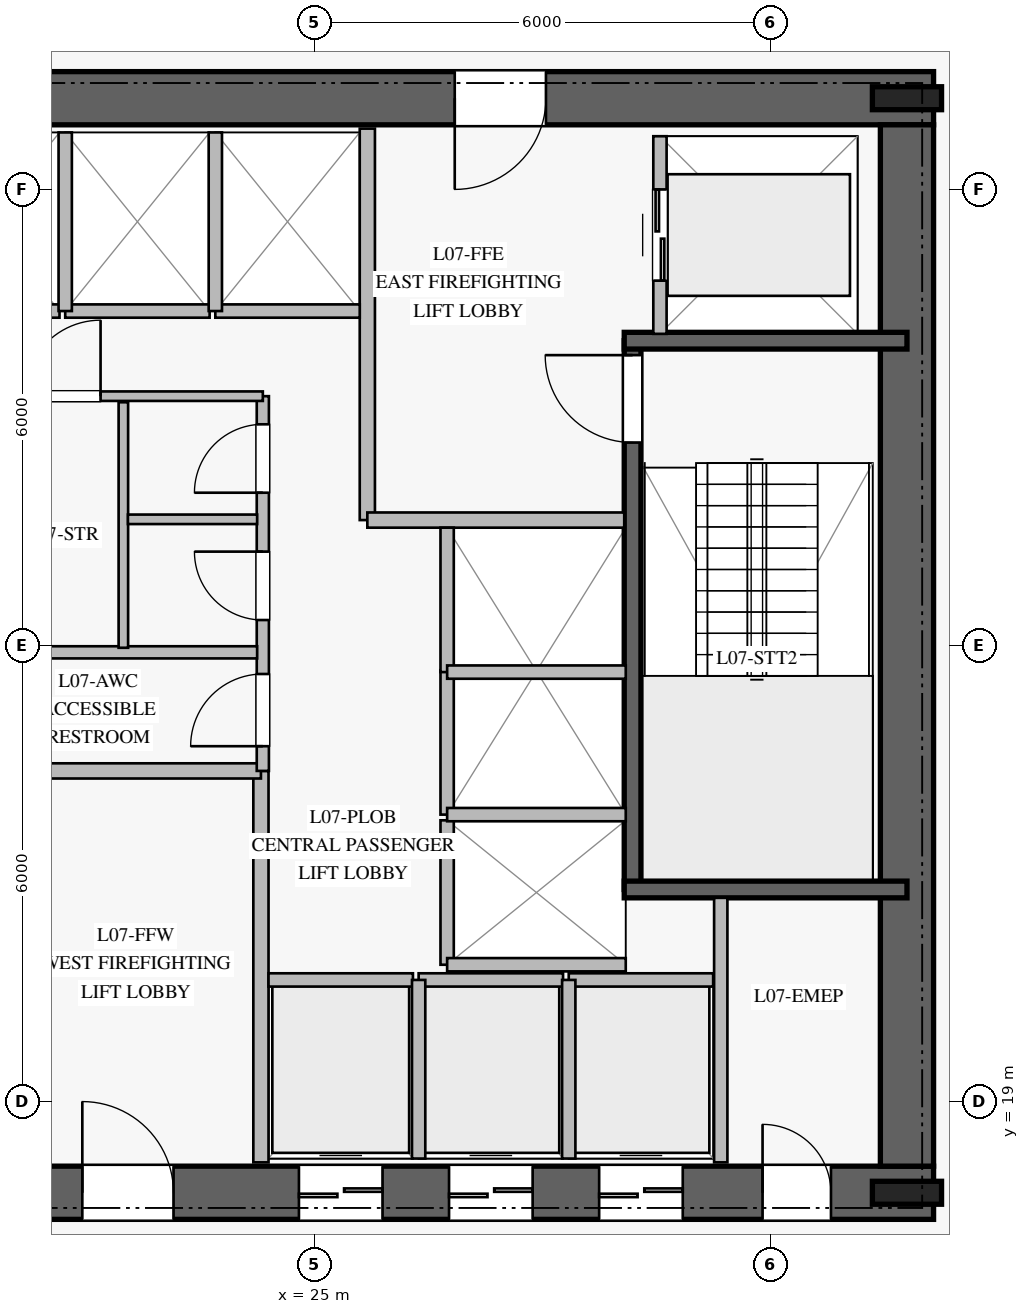
"""IFC4 building model, lengths in metres.
Left out: names, types, materials, properties, quantities, classifications, styles, units other than length and angle.
Written with IfcOpenShell. Run it as: python <this file> out.ifc"""

import sys

from ifc_helpers import new_model, si_unit, direction, frame, frame_2d, origin, origin_2d, place, context, subcontext, project, spatial, rectangle, i_section, extrude, element, fill, save


model = new_model("IFC4")
c1 = context("Model", 3, precision=1e-05, world=origin(), true_north=direction((0.0, 1.0)))
c2 = subcontext(c1, "Body", "Model", "MODEL_VIEW")
j1 = project(units=[si_unit("LENGTHUNIT", "METRE"), si_unit("PLANEANGLEUNIT", "RADIAN")], contexts=[c1])
p1 = place(None, origin())
s1 = spatial("IfcSite", under=j1, at=p1, CompositionType="ELEMENT")
p2 = place(p1, origin())
s2 = spatial("IfcBuilding", under=s1, at=p2, CompositionType="ELEMENT")
p3 = place(p2, frame((0.0, 0.0, 32.0)))
s3 = spatial("IfcBuildingStorey", under=s2, at=p3, CompositionType="ELEMENT", Elevation=32.0)
p4 = place(p3, frame((16.85, 17.8, 0.0), z_axis=(0.0, 0.0, 1.0), x_axis=(1.0, 0.0, 0.0)))
e1 = element("IfcWall", 1, at=p4, inside=s3, PredefinedType="SHEAR", context=c2, shape_type="SweptSolid", body=[
    extrude(rectangle(XDim=16.3, YDim=0.7, at=frame_2d((8.15, 0.0))), origin(), (0.0, 0.0, 1.0), 3.76),
])
p5 = place(p4, frame((5.1, 0.0, 0.0)))
e2 = element("IfcOpeningElement", 2, at=p5, cuts=e1, PredefinedType="OPENING", context=c2, shape_type="SweptSolid", body=[
    extrude(rectangle(XDim=1.2, YDim=2.25, at=frame_2d((0.6, 1.125))), frame((0.0, 0.36, 0.0), z_axis=(0.0, -1.0, 0.0), x_axis=(1.0, 0.0, 0.0)), (0.0, 0.0, 1.0), 0.72),
])
p6 = place(p4, frame((14.05, 0.0, 0.0)))
e3 = element("IfcOpeningElement", 3, at=p6, cuts=e1, PredefinedType="OPENING", context=c2, shape_type="SweptSolid", body=[
    extrude(rectangle(XDim=0.9, YDim=2.1, at=frame_2d((0.45, 1.05))), frame((0.0, 0.36, 0.0), z_axis=(0.0, -1.0, 0.0), x_axis=(1.0, 0.0, 0.0)), (0.0, 0.0, 1.0), 0.72),
])
p7 = place(p4, frame((7.95, 0.0, 0.0)))
e4 = element("IfcOpeningElement", 4, at=p7, cuts=e1, PredefinedType="OPENING", context=c2, shape_type="SweptSolid", body=[
    extrude(rectangle(XDim=1.1, YDim=2.2, at=frame_2d((0.55, 1.1))), frame((0.0, 0.36, 0.0), z_axis=(0.0, -1.0, 0.0), x_axis=(1.0, 0.0, 0.0)), (0.0, 0.0, 1.0), 0.72),
])
p8 = place(p4, frame((9.925, 0.0, 0.0)))
e5 = element("IfcOpeningElement", 5, at=p8, cuts=e1, PredefinedType="OPENING", context=c2, shape_type="SweptSolid", body=[
    extrude(rectangle(XDim=1.1, YDim=2.2, at=frame_2d((0.55, 1.1))), frame((0.0, 0.36, 0.0), z_axis=(0.0, -1.0, 0.0), x_axis=(1.0, 0.0, 0.0)), (0.0, 0.0, 1.0), 0.72),
])
p9 = place(p4, frame((11.9, 0.0, 0.0)))
e6 = element("IfcOpeningElement", 6, at=p9, cuts=e1, PredefinedType="OPENING", context=c2, shape_type="SweptSolid", body=[
    extrude(rectangle(XDim=1.1, YDim=2.2, at=frame_2d((0.55, 1.1))), frame((0.0, 0.36, 0.0), z_axis=(0.0, -1.0, 0.0), x_axis=(1.0, 0.0, 0.0)), (0.0, 0.0, 1.0), 0.72),
])
p10 = place(p3, frame((33.15, 32.2, 0.0), z_axis=(0.0, 0.0, 1.0), x_axis=(-1.0, 0.0, 0.0)))
e7 = element("IfcWall", 7, at=p10, inside=s3, PredefinedType="SHEAR", context=c2, shape_type="SweptSolid", body=[
    extrude(rectangle(XDim=16.3, YDim=0.7, at=frame_2d((8.15, 0.0))), origin(), (0.0, 0.0, 1.0), 3.76),
])
p11 = place(p10, frame((5.1, 0.0, 0.0)))
e8 = element("IfcOpeningElement", 8, at=p11, cuts=e7, PredefinedType="OPENING", context=c2, shape_type="SweptSolid", body=[
    extrude(rectangle(XDim=1.2, YDim=2.25, at=frame_2d((0.6, 1.125))), frame((0.0, 0.36, 0.0), z_axis=(0.0, -1.0, 0.0), x_axis=(1.0, 0.0, 0.0)), (0.0, 0.0, 1.0), 0.72),
])
p12 = place(p3, frame((32.8, 18.15, 0.0), z_axis=(0.0, 0.0, 1.0), x_axis=(0.0, 1.0, 0.0)))
e9 = element("IfcWall", 9, at=p12, inside=s3, PredefinedType="SHEAR", context=c2, shape_type="SweptSolid", body=[
    extrude(rectangle(XDim=13.7, YDim=0.7, at=frame_2d((6.85, 0.0))), origin(), (0.0, 0.0, 1.0), 3.76),
])
for number, where, z_axis, x_axis in (
    (10, (32.8, 17.8, 0.0), (0.0, 0.0, 1.0), (1.0, 0.0, 0.0)),
    (11, (32.8, 32.2, 0.0), (0.0, 0.0, 1.0), (1.0, 0.0, 0.0)),
):
    element("IfcColumn", number, at=place(p3, frame(where, z_axis=z_axis, x_axis=x_axis)), inside=s3, PredefinedType="COLUMN", context=c2, shape_type="SweptSolid", body=[
        extrude(i_section(OverallWidth=0.302, OverallDepth=0.91, WebThickness=0.021, FlangeThickness=0.04, at=origin_2d()), origin(), (0.0, 0.0, 1.0), 4.0),
    ])
p13 = place(p3, frame((29.19, 21.79, 0.0), z_axis=(0.0, 0.0, 1.0), x_axis=(0.0, 1.0, 0.0)))
e12 = element("IfcWall", 12, at=p13, inside=s3, PredefinedType="SOLIDWALL", context=c2, shape_type="SweptSolid", body=[
    extrude(rectangle(XDim=7.22, YDim=0.22, at=frame_2d((3.61, 0.0))), origin(), (0.0, 0.0, 1.0), 3.76),
])
p14 = place(p13, frame((5.88, 0.0, 0.0)))
e13 = element("IfcOpeningElement", 13, at=p14, cuts=e12, PredefinedType="OPENING", context=c2, shape_type="SweptSolid", body=[
    extrude(rectangle(XDim=1.15, YDim=2.2, at=frame_2d((0.575, 1.1))), frame((0.0, 0.12, 0.0), z_axis=(0.0, -1.0, 0.0), x_axis=(1.0, 0.0, 0.0)), (0.0, 0.0, 1.0), 0.24),
])
for number, where, z_axis, x_axis in (
    (14, (29.08, 21.79, 0.0), (0.0, 0.0, 1.0), (1.0, 0.0, 0.0)),
    (15, (29.08, 29.01, 0.0), (0.0, 0.0, 1.0), (1.0, 0.0, 0.0)),
):
    element("IfcWall", number, at=place(p3, frame(where, z_axis=z_axis, x_axis=x_axis)), inside=s3, PredefinedType="SOLIDWALL", context=c2, shape_type="SweptSolid", body=[
        extrude(rectangle(XDim=3.72, YDim=0.22, at=frame_2d((1.86, 0.0))), origin(), (0.0, 0.0, 1.0), 3.76),
    ])
p15 = place(p3, frame((24.3, 18.2, 0.0), z_axis=(0.0, 0.0, 1.0), x_axis=(0.0, 1.0, 0.0)))
e16 = element("IfcWall", 16, at=p15, inside=s3, PredefinedType="PARTITIONING", context=c2, shape_type="SweptSolid", body=[
    extrude(rectangle(XDim=5.15, YDim=0.2, at=frame_2d((2.575, 0.0))), origin(), (0.0, 0.0, 1.0), 3.76),
])
p16 = place(p3, frame((20.92, 23.35, 0.0), z_axis=(0.0, 0.0, 1.0), x_axis=(1.0, 0.0, 0.0)))
e17 = element("IfcWall", 17, at=p16, inside=s3, PredefinedType="PARTITIONING", context=c2, shape_type="SweptSolid", body=[
    extrude(rectangle(XDim=3.38, YDim=0.2, at=frame_2d((1.69, 0.0))), origin(), (0.0, 0.0, 1.0), 3.76),
])
p17 = place(p3, frame((25.7, 26.65, 0.0), z_axis=(0.0, 0.0, 1.0), x_axis=(0.0, 1.0, 0.0)))
e18 = element("IfcWall", 18, at=p17, inside=s3, PredefinedType="PARTITIONING", context=c2, shape_type="SweptSolid", body=[
    extrude(rectangle(XDim=5.15, YDim=0.2, at=frame_2d((2.575, 0.0))), origin(), (0.0, 0.0, 1.0), 3.76),
])
p18 = place(p3, frame((25.7, 26.65, 0.0), z_axis=(0.0, 0.0, 1.0), x_axis=(1.0, 0.0, 0.0)))
e19 = element("IfcWall", 19, at=p18, inside=s3, PredefinedType="PARTITIONING", context=c2, shape_type="SweptSolid", body=[
    extrude(rectangle(XDim=3.38, YDim=0.2, at=frame_2d((1.69, 0.0))), origin(), (0.0, 0.0, 1.0), 3.76),
])
p19 = place(p3, frame((24.325, 23.35, 0.0), z_axis=(0.0, 0.0, 1.0), x_axis=(0.0, 1.0, 0.0)))
e20 = element("IfcWall", 20, at=p19, inside=s3, PredefinedType="PLUMBINGWALL", context=c2, shape_type="SweptSolid", body=[
    extrude(rectangle(XDim=4.93, YDim=0.16, at=frame_2d((2.465, 0.0))), origin(), (0.0, 0.0, 1.0), 3.76),
])
p20 = place(p19, frame((0.325, 0.0, 0.0)))
e21 = element("IfcOpeningElement", 21, at=p20, cuts=e20, PredefinedType="OPENING", context=c2, shape_type="SweptSolid", body=[
    extrude(rectangle(XDim=0.95, YDim=2.1, at=frame_2d((0.475, 1.05))), frame((0.0, 0.09, 0.0), z_axis=(0.0, -1.0, 0.0), x_axis=(1.0, 0.0, 0.0)), (0.0, 0.0, 1.0), 0.18),
])
p21 = place(p19, frame((1.985, 0.0, 0.0)))
e22 = element("IfcOpeningElement", 22, at=p21, cuts=e20, PredefinedType="OPENING", context=c2, shape_type="SweptSolid", body=[
    extrude(rectangle(XDim=0.9, YDim=2.1, at=frame_2d((0.45, 1.05))), frame((0.0, 0.09, 0.0), z_axis=(0.0, -1.0, 0.0), x_axis=(1.0, 0.0, 0.0)), (0.0, 0.0, 1.0), 0.18),
])
p22 = place(p19, frame((3.66, 0.0, 0.0)))
e23 = element("IfcOpeningElement", 23, at=p22, cuts=e20, PredefinedType="OPENING", context=c2, shape_type="SweptSolid", body=[
    extrude(rectangle(XDim=0.9, YDim=2.1, at=frame_2d((0.45, 1.05))), frame((0.0, 0.09, 0.0), z_axis=(0.0, -1.0, 0.0), x_axis=(1.0, 0.0, 0.0)), (0.0, 0.0, 1.0), 0.18),
])
p23 = place(p3, frame((20.92, 28.28, 0.0), z_axis=(0.0, 0.0, 1.0), x_axis=(1.0, 0.0, 0.0)))
e24 = element("IfcWall", 24, at=p23, inside=s3, PredefinedType="PARTITIONING", context=c2, shape_type="SweptSolid", body=[
    extrude(rectangle(XDim=3.405, YDim=0.125, at=frame_2d((1.703, 0.0))), origin(), (0.0, 0.0, 1.0), 3.76),
])
p24 = place(p23, frame((0.27, 0.0, 0.0)))
e25 = element("IfcOpeningElement", 25, at=p24, cuts=e24, PredefinedType="OPENING", context=c2, shape_type="SweptSolid", body=[
    extrude(rectangle(XDim=1.0, YDim=2.15, at=frame_2d((0.5, 1.075))), frame((0.0, 0.073, 0.0), z_axis=(0.0, -1.0, 0.0), x_axis=(1.0, 0.0, 0.0)), (0.0, 0.0, 1.0), 0.145),
])
p25 = place(p3, frame((20.95, 24.91, 0.0), z_axis=(0.0, 0.0, 1.0), x_axis=(1.0, 0.0, 0.0)))
e26 = element("IfcWall", 26, at=p25, inside=s3, PredefinedType="PLUMBINGWALL", context=c2, shape_type="SweptSolid", body=[
    extrude(rectangle(XDim=3.3, YDim=0.16, at=frame_2d((1.65, 0.0))), origin(), (0.0, 0.0, 1.0), 3.76),
])
p26 = place(p3, frame((22.49, 24.97, 0.0), z_axis=(0.0, 0.0, 1.0), x_axis=(0.0, 1.0, 0.0)))
e27 = element("IfcWall", 27, at=p26, inside=s3, PredefinedType="PARTITIONING", context=c2, shape_type="SweptSolid", body=[
    extrude(rectangle(XDim=3.23, YDim=0.125, at=frame_2d((1.615, 0.0))), origin(), (0.0, 0.0, 1.0), 3.76),
])
p27 = place(p3, frame((22.55, 26.66, 0.0), z_axis=(0.0, 0.0, 1.0), x_axis=(1.0, 0.0, 0.0)))
e28 = element("IfcWall", 28, at=p27, inside=s3, PredefinedType="PARTITIONING", context=c2, shape_type="SweptSolid", body=[
    extrude(rectangle(XDim=1.7, YDim=0.125, at=frame_2d((0.85, 0.0))), origin(), (0.0, 0.0, 1.0), 3.76),
])
p28 = place(p3, frame((30.35, 18.2, 0.0), z_axis=(0.0, 0.0, 1.0), x_axis=(0.0, 1.0, 0.0)))
e29 = element("IfcWall", 29, at=p28, inside=s3, PredefinedType="PARTITIONING", context=c2, shape_type="SweptSolid", body=[
    extrude(rectangle(XDim=3.48, YDim=0.175, at=frame_2d((1.74, 0.0))), origin(), (0.0, 0.0, 1.0), 3.76),
])
p29 = place(p3, frame((24.4, 20.6, 0.0), z_axis=(0.0, 0.0, 1.0), x_axis=(1.0, 0.0, 0.0)))
e30 = element("IfcWall", 30, at=p29, inside=s3, PredefinedType="PARTITIONING", context=c2, shape_type="SweptSolid", body=[
    extrude(rectangle(XDim=1.9, YDim=0.175, at=frame_2d((0.95, 0.0))), origin(), (0.0, 0.0, 1.0), 3.76),
])
p30 = place(p3, frame((26.375, 20.6, 0.0), z_axis=(0.0, 0.0, 1.0), x_axis=(1.0, 0.0, 0.0)))
e31 = element("IfcWall", 31, at=p30, inside=s3, PredefinedType="PARTITIONING", context=c2, shape_type="SweptSolid", body=[
    extrude(rectangle(XDim=1.9, YDim=0.175, at=frame_2d((0.95, 0.0))), origin(), (0.0, 0.0, 1.0), 3.76),
])
p31 = place(p3, frame((26.375, 18.25, 0.0), z_axis=(0.0, 0.0, 1.0), x_axis=(0.0, 1.0, 0.0)))
e32 = element("IfcWall", 32, at=p31, inside=s3, PredefinedType="PARTITIONING", context=c2, shape_type="SweptSolid", body=[
    extrude(rectangle(XDim=2.35, YDim=0.175, at=frame_2d((1.175, 0.0))), origin(), (0.0, 0.0, 1.0), 3.76),
])
p32 = place(p3, frame((28.35, 20.6, 0.0), z_axis=(0.0, 0.0, 1.0), x_axis=(1.0, 0.0, 0.0)))
e33 = element("IfcWall", 33, at=p32, inside=s3, PredefinedType="PARTITIONING", context=c2, shape_type="SweptSolid", body=[
    extrude(rectangle(XDim=1.9, YDim=0.175, at=frame_2d((0.95, 0.0))), origin(), (0.0, 0.0, 1.0), 3.76),
])
p33 = place(p3, frame((28.35, 18.25, 0.0), z_axis=(0.0, 0.0, 1.0), x_axis=(0.0, 1.0, 0.0)))
e34 = element("IfcWall", 34, at=p33, inside=s3, PredefinedType="PARTITIONING", context=c2, shape_type="SweptSolid", body=[
    extrude(rectangle(XDim=2.35, YDim=0.175, at=frame_2d((1.175, 0.0))), origin(), (0.0, 0.0, 1.0), 3.76),
])
for number, where, z_axis, x_axis in (
    (35, (19.75, 29.4, 0.0), (0.0, 0.0, 1.0), (1.0, 0.0, 0.0)),
    (36, (21.725, 29.4, 0.0), (0.0, 0.0, 1.0), (1.0, 0.0, 0.0)),
):
    element("IfcWall", number, at=place(p3, frame(where, z_axis=z_axis, x_axis=x_axis)), inside=s3, PredefinedType="PARTITIONING", context=c2, shape_type="SweptSolid", body=[
        extrude(rectangle(XDim=1.9, YDim=0.175, at=frame_2d((0.95, 0.0))), origin(), (0.0, 0.0, 1.0), 3.76),
    ])
p34 = place(p3, frame((21.725, 29.4, 0.0), z_axis=(0.0, 0.0, 1.0), x_axis=(0.0, 1.0, 0.0)))
e37 = element("IfcWall", 37, at=p34, inside=s3, PredefinedType="PARTITIONING", context=c2, shape_type="SweptSolid", body=[
    extrude(rectangle(XDim=2.35, YDim=0.175, at=frame_2d((1.175, 0.0))), origin(), (0.0, 0.0, 1.0), 3.76),
])
p35 = place(p3, frame((23.7, 29.4, 0.0), z_axis=(0.0, 0.0, 1.0), x_axis=(1.0, 0.0, 0.0)))
e38 = element("IfcWall", 38, at=p35, inside=s3, PredefinedType="PARTITIONING", context=c2, shape_type="SweptSolid", body=[
    extrude(rectangle(XDim=1.9, YDim=0.175, at=frame_2d((0.95, 0.0))), origin(), (0.0, 0.0, 1.0), 3.76),
])
p36 = place(p3, frame((23.7, 29.4, 0.0), z_axis=(0.0, 0.0, 1.0), x_axis=(0.0, 1.0, 0.0)))
e39 = element("IfcWall", 39, at=p36, inside=s3, PredefinedType="PARTITIONING", context=c2, shape_type="SweptSolid", body=[
    extrude(rectangle(XDim=2.35, YDim=0.175, at=frame_2d((1.175, 0.0))), origin(), (0.0, 0.0, 1.0), 3.76),
])
p37 = place(p3, frame((26.75, 20.8, 0.0), z_axis=(0.0, 0.0, 1.0), x_axis=(0.0, 1.0, 0.0)))
e40 = element("IfcWall", 40, at=p37, inside=s3, PredefinedType="PARTITIONING", context=c2, shape_type="SweptSolid", body=[
    extrude(rectangle(XDim=1.9, YDim=0.175, at=frame_2d((0.95, 0.0))), origin(), (0.0, 0.0, 1.0), 3.76),
])
p38 = place(p3, frame((26.75, 20.8, 0.0), z_axis=(0.0, 0.0, 1.0), x_axis=(1.0, 0.0, 0.0)))
e41 = element("IfcWall", 41, at=p38, inside=s3, PredefinedType="PARTITIONING", context=c2, shape_type="SweptSolid", body=[
    extrude(rectangle(XDim=2.35, YDim=0.175, at=frame_2d((1.175, 0.0))), origin(), (0.0, 0.0, 1.0), 3.76),
])
p39 = place(p3, frame((26.75, 22.775, 0.0), z_axis=(0.0, 0.0, 1.0), x_axis=(0.0, 1.0, 0.0)))
e42 = element("IfcWall", 42, at=p39, inside=s3, PredefinedType="PARTITIONING", context=c2, shape_type="SweptSolid", body=[
    extrude(rectangle(XDim=1.9, YDim=0.175, at=frame_2d((0.95, 0.0))), origin(), (0.0, 0.0, 1.0), 3.76),
])
p40 = place(p3, frame((26.75, 22.775, 0.0), z_axis=(0.0, 0.0, 1.0), x_axis=(1.0, 0.0, 0.0)))
e43 = element("IfcWall", 43, at=p40, inside=s3, PredefinedType="PARTITIONING", context=c2, shape_type="SweptSolid", body=[
    extrude(rectangle(XDim=2.35, YDim=0.175, at=frame_2d((1.175, 0.0))), origin(), (0.0, 0.0, 1.0), 3.76),
])
p41 = place(p3, frame((26.75, 24.65, 0.0), z_axis=(0.0, 0.0, 1.0), x_axis=(0.0, 1.0, 0.0)))
e44 = element("IfcWall", 44, at=p41, inside=s3, PredefinedType="PARTITIONING", context=c2, shape_type="SweptSolid", body=[
    extrude(rectangle(XDim=1.9, YDim=0.175, at=frame_2d((0.95, 0.0))), origin(), (0.0, 0.0, 1.0), 3.76),
])
p42 = place(p3, frame((26.75, 24.65, 0.0), z_axis=(0.0, 0.0, 1.0), x_axis=(1.0, 0.0, 0.0)))
e45 = element("IfcWall", 45, at=p42, inside=s3, PredefinedType="PARTITIONING", context=c2, shape_type="SweptSolid", body=[
    extrude(rectangle(XDim=2.35, YDim=0.175, at=frame_2d((1.175, 0.0))), origin(), (0.0, 0.0, 1.0), 3.76),
])
p43 = place(p3, frame((29.55, 29.1, 0.0), z_axis=(0.0, 0.0, 1.0), x_axis=(0.0, 1.0, 0.0)))
e46 = element("IfcWall", 46, at=p43, inside=s3, PredefinedType="PARTITIONING", context=c2, shape_type="SweptSolid", body=[
    extrude(rectangle(XDim=2.6, YDim=0.175, at=frame_2d((1.3, 0.0))), origin(), (0.0, 0.0, 1.0), 3.76),
])
p44 = place(p43, frame((0.7, 0.0, 0.0)))
e47 = element("IfcOpeningElement", 47, at=p44, cuts=e46, PredefinedType="OPENING", context=c2, shape_type="SweptSolid", body=[
    extrude(rectangle(XDim=1.2, YDim=2.2, at=frame_2d((0.6, 1.1))), frame((0.0, 0.098, 0.0), z_axis=(0.0, -1.0, 0.0), x_axis=(1.0, 0.0, 0.0)), (0.0, 0.0, 1.0), 0.195),
])
p45 = place(p3, frame((9.867, 18.13, 0.0), z_axis=(0.0, 0.0, 1.0), x_axis=(0.856231759505, -0.516591883419, 0.0)))
e48 = element("IfcWall", 48, at=p45, inside=s3, PredefinedType="MOVABLE", context=c2, shape_type="SweptSolid", body=[
    extrude(rectangle(XDim=15.917, YDim=0.1, at=frame_2d((7.959, 0.0))), origin(), (0.0, 0.0, 1.0), 3.05),
])
p46 = place(p45, frame((7.459, 0.0, 0.0)))
e49 = element("IfcOpeningElement", 49, at=p46, cuts=e48, PredefinedType="OPENING", context=c2, shape_type="SweptSolid", body=[
    extrude(rectangle(XDim=1.0, YDim=2.15, at=frame_2d((0.5, 1.075))), frame((0.0, 0.06, 0.0), z_axis=(0.0, -1.0, 0.0), x_axis=(1.0, 0.0, 0.0)), (0.0, 0.0, 1.0), 0.12),
])
p47 = place(p14, origin())
e50 = element("IfcDoor", 50, at=p47, inside=s3, OperationType="SINGLE_SWING_RIGHT", PredefinedType="DOOR", context=c2, shape_type="SweptSolid", body=[
    extrude(rectangle(XDim=1.15, YDim=2.2, at=frame_2d((0.575, 1.1))), frame((0.0, 0.025, 0.0), z_axis=(0.0, -1.0, 0.0), x_axis=(1.0, 0.0, 0.0)), (0.0, 0.0, 1.0), 0.05),
])
fill(e13, e50)
p48 = place(p5, origin())
e51 = element("IfcDoor", 51, at=p48, inside=s3, OperationType="SINGLE_SWING_LEFT", PredefinedType="DOOR", context=c2, shape_type="SweptSolid", body=[
    extrude(rectangle(XDim=1.2, YDim=2.25, at=frame_2d((0.6, 1.125))), frame((0.0, 0.025, 0.0), z_axis=(0.0, -1.0, 0.0), x_axis=(1.0, 0.0, 0.0)), (0.0, 0.0, 1.0), 0.05),
])
fill(e2, e51)
p49 = place(p11, origin())
e52 = element("IfcDoor", 52, at=p49, inside=s3, OperationType="SINGLE_SWING_RIGHT", PredefinedType="DOOR", context=c2, shape_type="SweptSolid", body=[
    extrude(rectangle(XDim=1.2, YDim=2.25, at=frame_2d((0.6, 1.125))), frame((0.0, 0.025, 0.0), z_axis=(0.0, -1.0, 0.0), x_axis=(1.0, 0.0, 0.0)), (0.0, 0.0, 1.0), 0.05),
])
fill(e8, e52)
p50 = place(p20, origin())
e53 = element("IfcDoor", 53, at=p50, inside=s3, OperationType="SINGLE_SWING_LEFT", PredefinedType="DOOR", context=c2, shape_type="SweptSolid", body=[
    extrude(rectangle(XDim=0.95, YDim=2.1, at=frame_2d((0.475, 1.05))), frame((0.0, 0.025, 0.0), z_axis=(0.0, -1.0, 0.0), x_axis=(1.0, 0.0, 0.0)), (0.0, 0.0, 1.0), 0.05),
])
fill(e21, e53)
p51 = place(p21, origin())
e54 = element("IfcDoor", 54, at=p51, inside=s3, OperationType="SINGLE_SWING_RIGHT", PredefinedType="DOOR", context=c2, shape_type="SweptSolid", body=[
    extrude(rectangle(XDim=0.9, YDim=2.1, at=frame_2d((0.45, 1.05))), frame((0.0, 0.025, 0.0), z_axis=(0.0, -1.0, 0.0), x_axis=(1.0, 0.0, 0.0)), (0.0, 0.0, 1.0), 0.05),
])
fill(e22, e54)
p52 = place(p22, origin())
e55 = element("IfcDoor", 55, at=p52, inside=s3, OperationType="SINGLE_SWING_LEFT", PredefinedType="DOOR", context=c2, shape_type="SweptSolid", body=[
    extrude(rectangle(XDim=0.9, YDim=2.1, at=frame_2d((0.45, 1.05))), frame((0.0, 0.025, 0.0), z_axis=(0.0, -1.0, 0.0), x_axis=(1.0, 0.0, 0.0)), (0.0, 0.0, 1.0), 0.05),
])
fill(e23, e55)
p53 = place(p24, origin())
e56 = element("IfcDoor", 56, at=p53, inside=s3, OperationType="SINGLE_SWING_RIGHT", PredefinedType="DOOR", context=c2, shape_type="SweptSolid", body=[
    extrude(rectangle(XDim=1.0, YDim=2.15, at=frame_2d((0.5, 1.075))), frame((0.0, 0.025, 0.0), z_axis=(0.0, -1.0, 0.0), x_axis=(1.0, 0.0, 0.0)), (0.0, 0.0, 1.0), 0.05),
])
fill(e25, e56)
p54 = place(p6, origin())
e57 = element("IfcDoor", 57, at=p54, inside=s3, OperationType="SINGLE_SWING_LEFT", PredefinedType="DOOR", context=c2, shape_type="SweptSolid", body=[
    extrude(rectangle(XDim=0.9, YDim=2.1, at=frame_2d((0.45, 1.05))), frame((0.0, 0.025, 0.0), z_axis=(0.0, -1.0, 0.0), x_axis=(1.0, 0.0, 0.0)), (0.0, 0.0, 1.0), 0.05),
])
fill(e3, e57)
p55 = place(p7, origin())
e58 = element("IfcDoor", 58, at=p55, inside=s3, OperationType="DOUBLE_DOOR_SLIDING", PredefinedType="DOOR", context=c2, shape_type="SweptSolid", body=[
    extrude(rectangle(XDim=1.1, YDim=2.2, at=frame_2d((0.55, 1.1))), frame((0.0, 0.025, 0.0), z_axis=(0.0, -1.0, 0.0), x_axis=(1.0, 0.0, 0.0)), (0.0, 0.0, 1.0), 0.05),
])
fill(e4, e58)
p56 = place(p8, origin())
e59 = element("IfcDoor", 59, at=p56, inside=s3, OperationType="DOUBLE_DOOR_SLIDING", PredefinedType="DOOR", context=c2, shape_type="SweptSolid", body=[
    extrude(rectangle(XDim=1.1, YDim=2.2, at=frame_2d((0.55, 1.1))), frame((0.0, 0.025, 0.0), z_axis=(0.0, -1.0, 0.0), x_axis=(1.0, 0.0, 0.0)), (0.0, 0.0, 1.0), 0.05),
])
fill(e5, e59)
p57 = place(p9, origin())
e60 = element("IfcDoor", 60, at=p57, inside=s3, OperationType="DOUBLE_DOOR_SLIDING", PredefinedType="DOOR", context=c2, shape_type="SweptSolid", body=[
    extrude(rectangle(XDim=1.1, YDim=2.2, at=frame_2d((0.55, 1.1))), frame((0.0, 0.025, 0.0), z_axis=(0.0, -1.0, 0.0), x_axis=(1.0, 0.0, 0.0)), (0.0, 0.0, 1.0), 0.05),
])
fill(e6, e60)
p58 = place(p44, origin())
e61 = element("IfcDoor", 61, at=p58, inside=s3, OperationType="DOUBLE_DOOR_SLIDING", PredefinedType="DOOR", context=c2, shape_type="SweptSolid", body=[
    extrude(rectangle(XDim=1.2, YDim=2.2, at=frame_2d((0.6, 1.1))), frame((0.0, 0.025, 0.0), z_axis=(0.0, -1.0, 0.0), x_axis=(1.0, 0.0, 0.0)), (0.0, 0.0, 1.0), 0.05),
])
fill(e47, e61)
save(model, sys.argv[1])
